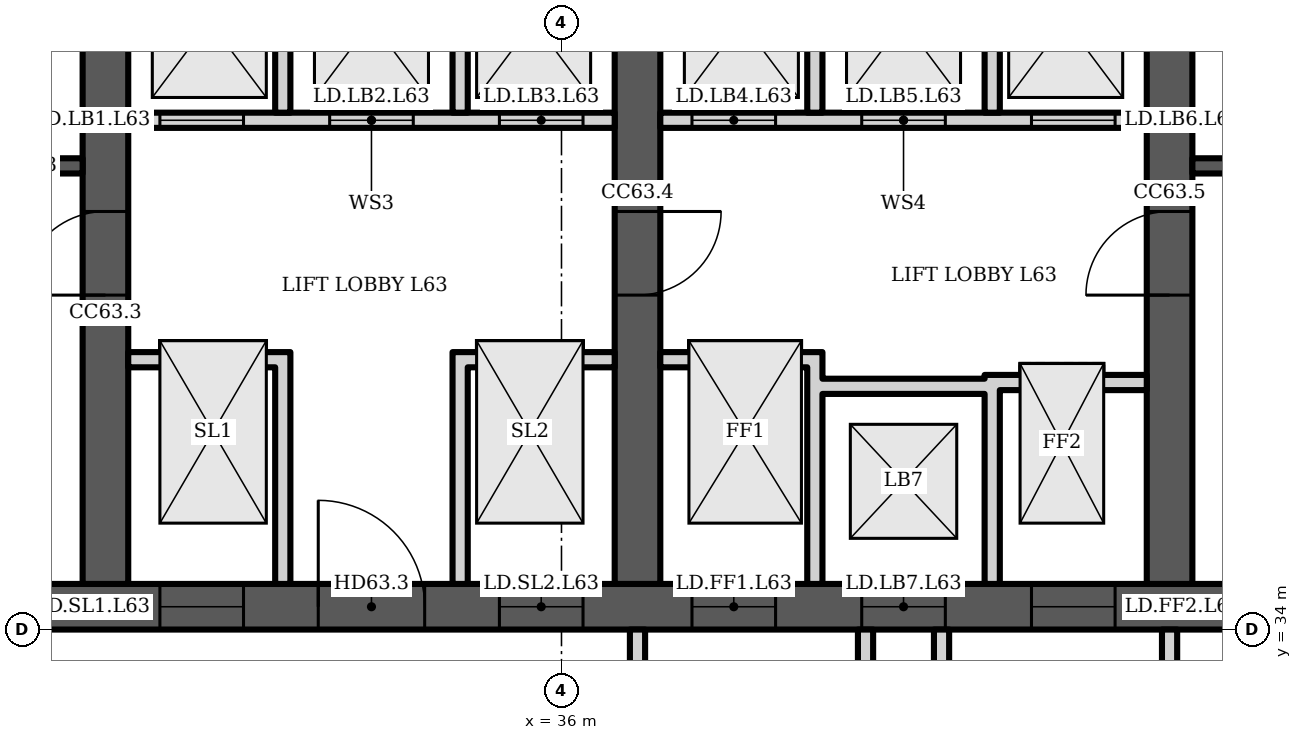
"""IFC4 building model, lengths in metres.
Left out: names, types, materials, properties, quantities, classifications, styles, units other than length and angle.
Written with IfcOpenShell. Run it as: python <this file> out.ifc"""

import sys

from ifc_helpers import new_model, si_unit, direction, frame, frame_2d, origin, place, context, subcontext, project, spatial, polyline, rectangle, outline, extrude, element, fill, save


model = new_model("IFC4")
c1 = context("Model", 3, precision=1e-05, world=origin(), true_north=direction((0.0, 1.0)))
c2 = subcontext(c1, "Body", "Model", "MODEL_VIEW")
j1 = project(units=[si_unit("LENGTHUNIT", "METRE"), si_unit("PLANEANGLEUNIT", "RADIAN")], contexts=[c1])
p1 = place(None, origin())
s1 = spatial("IfcSite", under=j1, at=p1, CompositionType="ELEMENT")
p2 = place(p1, origin())
s2 = spatial("IfcBuilding", under=s1, at=p2, CompositionType="ELEMENT")
p3 = place(p2, frame((0.0, 0.0, 250.3)))
s3 = spatial("IfcBuildingStorey", under=s2, at=p3, CompositionType="ELEMENT", Elevation=250.3)
p4 = place(p3, frame((23.0, 34.3, 0.0), z_axis=(0.0, 0.0, 1.0), x_axis=(1.0, 0.0, 0.0)))
e1 = element("IfcWall", 1, at=p4, inside=s3, PredefinedType="SHEAR", context=c2, shape_type="SweptSolid", body=[
    extrude(rectangle(XDim=35.0, YDim=0.6, at=frame_2d((17.5, 0.0))), origin(), (0.0, 0.0, 1.0), 3.6),
])
p5 = place(p4, frame((0.65, 0.0, 0.0)))
e2 = element("IfcOpeningElement", 2, at=p5, cuts=e1, PredefinedType="OPENING", context=c2, shape_type="SweptSolid", body=[
    extrude(rectangle(XDim=1.2, YDim=2.1, at=frame_2d((0.6, 1.05))), frame((0.0, 0.31, 0.0), z_axis=(0.0, -1.0, 0.0), x_axis=(1.0, 0.0, 0.0)), (0.0, 0.0, 1.0), 0.62),
])
p6 = place(p4, frame((7.717, 0.0, 0.0)))
e3 = element("IfcOpeningElement", 3, at=p6, cuts=e1, PredefinedType="OPENING", context=c2, shape_type="SweptSolid", body=[
    extrude(rectangle(XDim=1.1, YDim=2.1, at=frame_2d((0.55, 1.05))), frame((0.0, 0.31, 0.0), z_axis=(0.0, -1.0, 0.0), x_axis=(1.0, 0.0, 0.0)), (0.0, 0.0, 1.0), 0.62),
])
p7 = place(p4, frame((12.183, 0.0, 0.0)))
e4 = element("IfcOpeningElement", 4, at=p7, cuts=e1, PredefinedType="OPENING", context=c2, shape_type="SweptSolid", body=[
    extrude(rectangle(XDim=1.1, YDim=2.1, at=frame_2d((0.55, 1.05))), frame((0.0, 0.31, 0.0), z_axis=(0.0, -1.0, 0.0), x_axis=(1.0, 0.0, 0.0)), (0.0, 0.0, 1.0), 0.62),
])
p8 = place(p4, frame((9.8, 0.0, 0.0)))
e5 = element("IfcOpeningElement", 5, at=p8, cuts=e1, PredefinedType="OPENING", context=c2, shape_type="SweptSolid", body=[
    extrude(rectangle(XDim=1.4, YDim=2.1, at=frame_2d((0.7, 1.05))), frame((0.0, 0.31, 0.0), z_axis=(0.0, -1.0, 0.0), x_axis=(1.0, 0.0, 0.0)), (0.0, 0.0, 1.0), 0.62),
])
p9 = place(p4, frame((14.717, 0.0, 0.0)))
e6 = element("IfcOpeningElement", 6, at=p9, cuts=e1, PredefinedType="OPENING", context=c2, shape_type="SweptSolid", body=[
    extrude(rectangle(XDim=1.1, YDim=2.1, at=frame_2d((0.55, 1.05))), frame((0.0, 0.31, 0.0), z_axis=(0.0, -1.0, 0.0), x_axis=(1.0, 0.0, 0.0)), (0.0, 0.0, 1.0), 0.62),
])
p10 = place(p4, frame((16.95, 0.0, 0.0)))
e7 = element("IfcOpeningElement", 7, at=p10, cuts=e1, PredefinedType="OPENING", context=c2, shape_type="SweptSolid", body=[
    extrude(rectangle(XDim=1.1, YDim=2.1, at=frame_2d((0.55, 1.05))), frame((0.0, 0.31, 0.0), z_axis=(0.0, -1.0, 0.0), x_axis=(1.0, 0.0, 0.0)), (0.0, 0.0, 1.0), 0.62),
])
p11 = place(p4, frame((19.183, 0.0, 0.0)))
e8 = element("IfcOpeningElement", 8, at=p11, cuts=e1, PredefinedType="OPENING", context=c2, shape_type="SweptSolid", body=[
    extrude(rectangle(XDim=1.1, YDim=2.1, at=frame_2d((0.55, 1.05))), frame((0.0, 0.31, 0.0), z_axis=(0.0, -1.0, 0.0), x_axis=(1.0, 0.0, 0.0)), (0.0, 0.0, 1.0), 0.62),
])
p12 = place(p4, frame((26.15, 0.0, 0.0)))
e9 = element("IfcOpeningElement", 9, at=p12, cuts=e1, PredefinedType="OPENING", context=c2, shape_type="SweptSolid", body=[
    extrude(rectangle(XDim=1.2, YDim=2.1, at=frame_2d((0.6, 1.05))), frame((0.0, 0.31, 0.0), z_axis=(0.0, -1.0, 0.0), x_axis=(1.0, 0.0, 0.0)), (0.0, 0.0, 1.0), 0.62),
])
p13 = place(p4, frame((28.767, 0.0, 0.0)))
e10 = element("IfcOpeningElement", 10, at=p13, cuts=e1, PredefinedType="OPENING", context=c2, shape_type="SweptSolid", body=[
    extrude(rectangle(XDim=1.0, YDim=2.1, at=frame_2d((0.5, 1.05))), frame((0.0, 0.31, 0.0), z_axis=(0.0, -1.0, 0.0), x_axis=(1.0, 0.0, 0.0)), (0.0, 0.0, 1.0), 0.62),
])
p14 = place(p4, frame((33.083, 0.0, 0.0)))
e11 = element("IfcOpeningElement", 11, at=p14, cuts=e1, PredefinedType="OPENING", context=c2, shape_type="SweptSolid", body=[
    extrude(rectangle(XDim=1.0, YDim=2.1, at=frame_2d((0.5, 1.05))), frame((0.0, 0.31, 0.0), z_axis=(0.0, -1.0, 0.0), x_axis=(1.0, 0.0, 0.0)), (0.0, 0.0, 1.0), 0.62),
])
p15 = place(p4, frame((30.8, 0.0, 0.0)))
e12 = element("IfcOpeningElement", 12, at=p15, cuts=e1, PredefinedType="OPENING", context=c2, shape_type="SweptSolid", body=[
    extrude(rectangle(XDim=1.4, YDim=2.1, at=frame_2d((0.7, 1.05))), frame((0.0, 0.31, 0.0), z_axis=(0.0, -1.0, 0.0), x_axis=(1.0, 0.0, 0.0)), (0.0, 0.0, 1.0), 0.62),
])
p16 = place(p3, frame((30.0, 34.6, 0.0), z_axis=(0.0, 0.0, 1.0), x_axis=(0.0, 1.0, 0.0)))
e13 = element("IfcWall", 13, at=p16, inside=s3, PredefinedType="SHEAR", context=c2, shape_type="SweptSolid", body=[
    extrude(rectangle(XDim=14.171, YDim=0.6, at=frame_2d((7.085, 0.0))), origin(), (0.0, 0.0, 1.0), 3.6),
])
p17 = place(p16, frame((3.8, 0.0, 0.0)))
e14 = element("IfcOpeningElement", 14, at=p17, cuts=e13, PredefinedType="OPENING", context=c2, shape_type="SweptSolid", body=[
    extrude(rectangle(XDim=1.1, YDim=2.1, at=frame_2d((0.55, 1.05))), frame((0.0, 0.31, 0.0), z_axis=(0.0, -1.0, 0.0), x_axis=(1.0, 0.0, 0.0)), (0.0, 0.0, 1.0), 0.62),
])
p18 = place(p3, frame((37.0, 34.6, 0.0), z_axis=(0.0, 0.0, 1.0), x_axis=(0.0, 1.0, 0.0)))
e15 = element("IfcWall", 15, at=p18, inside=s3, PredefinedType="SHEAR", context=c2, shape_type="SweptSolid", body=[
    extrude(rectangle(XDim=14.784, YDim=0.6, at=frame_2d((7.392, 0.0))), origin(), (0.0, 0.0, 1.0), 3.6),
])
p19 = place(p18, frame((11.302, 0.0, 0.0)))
e16 = element("IfcOpeningElement", 16, at=p19, cuts=e15, PredefinedType="OPENING", context=c2, shape_type="SweptSolid", body=[
    extrude(rectangle(XDim=1.0, YDim=2.1, at=frame_2d((0.5, 1.05))), frame((0.0, 0.31, 0.0), z_axis=(0.0, -1.0, 0.0), x_axis=(1.0, 0.0, 0.0)), (0.0, 0.0, 1.0), 0.62),
])
p20 = place(p18, frame((3.8, 0.0, 0.0)))
e17 = element("IfcOpeningElement", 17, at=p20, cuts=e15, PredefinedType="OPENING", context=c2, shape_type="SweptSolid", body=[
    extrude(rectangle(XDim=1.1, YDim=2.1, at=frame_2d((0.55, 1.05))), frame((0.0, 0.31, 0.0), z_axis=(0.0, -1.0, 0.0), x_axis=(1.0, 0.0, 0.0)), (0.0, 0.0, 1.0), 0.62),
])
p21 = place(p3, frame((44.0, 34.6, 0.0), z_axis=(0.0, 0.0, 1.0), x_axis=(0.0, 1.0, 0.0)))
e18 = element("IfcWall", 18, at=p21, inside=s3, PredefinedType="SHEAR", context=c2, shape_type="SweptSolid", body=[
    extrude(rectangle(XDim=14.784, YDim=0.6, at=frame_2d((7.392, 0.0))), origin(), (0.0, 0.0, 1.0), 3.6),
])
p22 = place(p21, frame((11.608, 0.0, 0.0)))
e19 = element("IfcOpeningElement", 19, at=p22, cuts=e18, PredefinedType="OPENING", context=c2, shape_type="SweptSolid", body=[
    extrude(rectangle(XDim=1.0, YDim=2.1, at=frame_2d((0.5, 1.05))), frame((0.0, 0.31, 0.0), z_axis=(0.0, -1.0, 0.0), x_axis=(1.0, 0.0, 0.0)), (0.0, 0.0, 1.0), 0.62),
])
p23 = place(p21, frame((3.8, 0.0, 0.0)))
e20 = element("IfcOpeningElement", 20, at=p23, cuts=e18, PredefinedType="OPENING", context=c2, shape_type="SweptSolid", body=[
    extrude(rectangle(XDim=1.1, YDim=2.1, at=frame_2d((0.55, 1.05))), frame((0.0, 0.31, 0.0), z_axis=(0.0, -1.0, 0.0), x_axis=(1.0, 0.0, 0.0)), (0.0, 0.0, 1.0), 0.62),
])
p24 = place(p3, frame((23.6, 40.1, 0.0), z_axis=(0.0, 0.0, 1.0), x_axis=(1.0, 0.0, 0.0)))
e21 = element("IfcWall", 21, at=p24, inside=s3, PredefinedType="SHEAR", context=c2, shape_type="SweptSolid", body=[
    extrude(rectangle(XDim=6.1, YDim=0.2, at=frame_2d((3.05, 0.0))), origin(), (0.0, 0.0, 1.0), 3.2),
])
p25 = place(p24, frame((3.325, 0.0, 0.0)))
e22 = element("IfcOpeningElement", 22, at=p25, cuts=e21, PredefinedType="OPENING", context=c2, shape_type="SweptSolid", body=[
    extrude(rectangle(XDim=1.2, YDim=2.1, at=frame_2d((0.6, 1.05))), frame((0.0, 0.11, 0.0), z_axis=(0.0, -1.0, 0.0), x_axis=(1.0, 0.0, 0.0)), (0.0, 0.0, 1.0), 0.22),
])
p26 = place(p24, frame((0.475, 0.0, 0.0)))
e23 = element("IfcOpeningElement", 23, at=p26, cuts=e21, PredefinedType="OPENING", context=c2, shape_type="SweptSolid", body=[
    extrude(rectangle(XDim=0.9, YDim=2.1, at=frame_2d((0.45, 1.05))), frame((0.0, 0.11, 0.0), z_axis=(0.0, -1.0, 0.0), x_axis=(1.0, 0.0, 0.0)), (0.0, 0.0, 1.0), 0.22),
])
p27 = place(p3, frame((30.3, 40.7, 0.0), z_axis=(0.0, 0.0, 1.0), x_axis=(1.0, 0.0, 0.0)))
e24 = element("IfcWall", 24, at=p27, inside=s3, PredefinedType="PARTITIONING", context=c2, shape_type="SweptSolid", body=[
    extrude(rectangle(XDim=6.4, YDim=0.2, at=frame_2d((3.2, 0.0))), origin(), (0.0, 0.0, 1.0), 3.2),
])
p28 = place(p27, frame((0.417, 0.0, 0.0)))
e25 = element("IfcOpeningElement", 25, at=p28, cuts=e24, PredefinedType="OPENING", context=c2, shape_type="SweptSolid", body=[
    extrude(rectangle(XDim=1.1, YDim=2.1, at=frame_2d((0.55, 1.05))), frame((0.0, 0.11, 0.0), z_axis=(0.0, -1.0, 0.0), x_axis=(1.0, 0.0, 0.0)), (0.0, 0.0, 1.0), 0.22),
])
p29 = place(p27, frame((2.65, 0.0, 0.0)))
e26 = element("IfcOpeningElement", 26, at=p29, cuts=e24, PredefinedType="OPENING", context=c2, shape_type="SweptSolid", body=[
    extrude(rectangle(XDim=1.1, YDim=2.1, at=frame_2d((0.55, 1.05))), frame((0.0, 0.11, 0.0), z_axis=(0.0, -1.0, 0.0), x_axis=(1.0, 0.0, 0.0)), (0.0, 0.0, 1.0), 0.22),
])
p30 = place(p27, frame((4.883, 0.0, 0.0)))
e27 = element("IfcOpeningElement", 27, at=p30, cuts=e24, PredefinedType="OPENING", context=c2, shape_type="SweptSolid", body=[
    extrude(rectangle(XDim=1.1, YDim=2.1, at=frame_2d((0.55, 1.05))), frame((0.0, 0.11, 0.0), z_axis=(0.0, -1.0, 0.0), x_axis=(1.0, 0.0, 0.0)), (0.0, 0.0, 1.0), 0.22),
])
p31 = place(p3, frame((0.0, 0.0, -0.0)))
e28 = element("IfcWall", 28, at=p31, inside=s3, PredefinedType="PARTITIONING", context=c2, shape_type="SweptSolid", body=[
    extrude(outline(polyline([(32.233, 37.45), (30.3, 37.45), (30.3, 37.65), (32.233, 37.65), (32.433, 37.65), (32.433, 34.6), (32.233, 34.6), (32.233, 37.45)])), origin(), (0.0, 0.0, 1.0), 3.2),
])
p32 = place(p3, frame((0.0, 0.0, -0.0)))
e29 = element("IfcWall", 29, at=p32, inside=s3, PredefinedType="PARTITIONING", context=c2, shape_type="SweptSolid", body=[
    extrude(outline(polyline([(34.567, 37.65), (34.767, 37.65), (36.7, 37.65), (36.7, 37.45), (34.767, 37.45), (34.767, 34.6), (34.567, 34.6), (34.567, 37.65)])), origin(), (0.0, 0.0, 1.0), 3.2),
])
p33 = place(p3, frame((0.0, 0.0, -0.0)))
e30 = element("IfcWall", 30, at=p33, inside=s3, PredefinedType="PARTITIONING", context=c2, shape_type="SweptSolid", body=[
    extrude(outline(polyline([(32.433, 40.8), (32.233, 40.8), (32.233, 43.8), (30.3, 43.8), (30.3, 44.0), (36.7, 44.0), (36.7, 43.8), (34.767, 43.8), (34.767, 40.8), (34.567, 40.8), (34.567, 43.8), (32.433, 43.8), (32.433, 40.8)])), origin(), (0.0, 0.0, 1.0), 3.2),
])
p34 = place(p3, frame((37.3, 40.7, 0.0), z_axis=(0.0, 0.0, 1.0), x_axis=(1.0, 0.0, 0.0)))
e31 = element("IfcWall", 31, at=p34, inside=s3, PredefinedType="PARTITIONING", context=c2, shape_type="SweptSolid", body=[
    extrude(rectangle(XDim=6.4, YDim=0.2, at=frame_2d((3.2, 0.0))), origin(), (0.0, 0.0, 1.0), 3.2),
])
p35 = place(p34, frame((0.417, 0.0, 0.0)))
e32 = element("IfcOpeningElement", 32, at=p35, cuts=e31, PredefinedType="OPENING", context=c2, shape_type="SweptSolid", body=[
    extrude(rectangle(XDim=1.1, YDim=2.1, at=frame_2d((0.55, 1.05))), frame((0.0, 0.11, 0.0), z_axis=(0.0, -1.0, 0.0), x_axis=(1.0, 0.0, 0.0)), (0.0, 0.0, 1.0), 0.22),
])
p36 = place(p34, frame((2.65, 0.0, 0.0)))
e33 = element("IfcOpeningElement", 33, at=p36, cuts=e31, PredefinedType="OPENING", context=c2, shape_type="SweptSolid", body=[
    extrude(rectangle(XDim=1.1, YDim=2.1, at=frame_2d((0.55, 1.05))), frame((0.0, 0.11, 0.0), z_axis=(0.0, -1.0, 0.0), x_axis=(1.0, 0.0, 0.0)), (0.0, 0.0, 1.0), 0.22),
])
p37 = place(p34, frame((4.883, 0.0, 0.0)))
e34 = element("IfcOpeningElement", 34, at=p37, cuts=e31, PredefinedType="OPENING", context=c2, shape_type="SweptSolid", body=[
    extrude(rectangle(XDim=1.1, YDim=2.1, at=frame_2d((0.55, 1.05))), frame((0.0, 0.11, 0.0), z_axis=(0.0, -1.0, 0.0), x_axis=(1.0, 0.0, 0.0)), (0.0, 0.0, 1.0), 0.22),
])
p38 = place(p3, frame((0.0, 0.0, -0.0)))
e35 = element("IfcWall", 35, at=p38, inside=s3, PredefinedType="PARTITIONING", context=c2, shape_type="SweptSolid", body=[
    extrude(outline(polyline([(41.567, 37.1), (39.433, 37.1), (39.433, 34.6), (39.233, 34.6), (39.233, 37.45), (37.3, 37.45), (37.3, 37.65), (39.233, 37.65), (39.433, 37.65), (39.433, 37.3), (41.567, 37.3), (41.567, 37.35), (41.767, 37.35), (43.7, 37.35), (43.7, 37.15), (41.767, 37.15), (41.767, 34.6), (41.567, 34.6), (41.567, 37.1)])), origin(), (0.0, 0.0, 1.0), 3.2),
])
p39 = place(p3, frame((0.0, 0.0, -0.0)))
e36 = element("IfcWall", 36, at=p39, inside=s3, PredefinedType="PARTITIONING", context=c2, shape_type="SweptSolid", body=[
    extrude(outline(polyline([(39.433, 40.8), (39.233, 40.8), (39.233, 43.8), (37.3, 43.8), (37.3, 44.0), (43.7, 44.0), (43.7, 43.8), (41.767, 43.8), (41.767, 40.8), (41.567, 40.8), (41.567, 43.8), (39.433, 43.8), (39.433, 40.8)])), origin(), (0.0, 0.0, 1.0), 3.2),
])
p40 = place(p3, frame((44.3, 40.1, 0.0), z_axis=(0.0, 0.0, 1.0), x_axis=(1.0, 0.0, 0.0)))
e37 = element("IfcWall", 37, at=p40, inside=s3, PredefinedType="SHEAR", context=c2, shape_type="SweptSolid", body=[
    extrude(rectangle(XDim=6.4, YDim=0.2, at=frame_2d((3.2, 0.0))), origin(), (0.0, 0.0, 1.0), 3.2),
])
p41 = place(p40, frame((3.625, 0.0, 0.0)))
e38 = element("IfcOpeningElement", 38, at=p41, cuts=e37, PredefinedType="OPENING", context=c2, shape_type="SweptSolid", body=[
    extrude(rectangle(XDim=1.2, YDim=2.1, at=frame_2d((0.6, 1.05))), frame((0.0, 0.11, 0.0), z_axis=(0.0, -1.0, 0.0), x_axis=(1.0, 0.0, 0.0)), (0.0, 0.0, 1.0), 0.22),
])
p42 = place(p40, frame((0.625, 0.0, 0.0)))
e39 = element("IfcOpeningElement", 39, at=p42, cuts=e37, PredefinedType="OPENING", context=c2, shape_type="SweptSolid", body=[
    extrude(rectangle(XDim=0.9, YDim=2.1, at=frame_2d((0.45, 1.05))), frame((0.0, 0.11, 0.0), z_axis=(0.0, -1.0, 0.0), x_axis=(1.0, 0.0, 0.0)), (0.0, 0.0, 1.0), 0.22),
])
p43 = place(p3, frame((37.0, 30.5, 0.0), z_axis=(0.0, 0.0, 1.0), x_axis=(0.0, 1.0, 0.0)))
e40 = element("IfcWall", 40, at=p43, inside=s3, PredefinedType="PARTITIONING", context=c2, shape_type="SweptSolid", body=[
    extrude(rectangle(XDim=3.5, YDim=0.2, at=frame_2d((1.75, 0.0))), origin(), (0.0, 0.0, 1.0), 3.2),
])
p44 = place(p43, frame((1.2, 0.0, 0.0)))
e41 = element("IfcOpeningElement", 41, at=p44, cuts=e40, PredefinedType="OPENING", context=c2, shape_type="SweptSolid", body=[
    extrude(rectangle(XDim=1.1, YDim=2.1, at=frame_2d((0.55, 1.05))), frame((0.0, 0.11, 0.0), z_axis=(0.0, -1.0, 0.0), x_axis=(1.0, 0.0, 0.0)), (0.0, 0.0, 1.0), 0.22),
])
for number, where, z_axis, x_axis in (
    (42, (40.0, 30.5, 0.0), (0.0, 0.0, 1.0), (0.0, 1.0, 0.0)),
    (43, (41.0, 30.5, 0.0), (0.0, 0.0, 1.0), (0.0, 1.0, 0.0)),
):
    element("IfcWall", number, at=place(p3, frame(where, z_axis=z_axis, x_axis=x_axis)), inside=s3, PredefinedType="PARTITIONING", context=c2, shape_type="SweptSolid", body=[
        extrude(rectangle(XDim=3.5, YDim=0.2, at=frame_2d((1.75, 0.0))), origin(), (0.0, 0.0, 1.0), 3.2),
    ])
p45 = place(p3, frame((44.0, 30.5, 0.0), z_axis=(0.0, 0.0, 1.0), x_axis=(0.0, 1.0, 0.0)))
e44 = element("IfcWall", 44, at=p45, inside=s3, PredefinedType="PARTITIONING", context=c2, shape_type="SweptSolid", body=[
    extrude(rectangle(XDim=3.5, YDim=0.2, at=frame_2d((1.75, 0.0))), origin(), (0.0, 0.0, 1.0), 3.2),
])
p46 = place(p45, frame((1.2, 0.0, 0.0)))
e45 = element("IfcOpeningElement", 45, at=p46, cuts=e44, PredefinedType="OPENING", context=c2, shape_type="SweptSolid", body=[
    extrude(rectangle(XDim=1.1, YDim=2.1, at=frame_2d((0.55, 1.05))), frame((0.0, 0.11, 0.0), z_axis=(0.0, -1.0, 0.0), x_axis=(1.0, 0.0, 0.0)), (0.0, 0.0, 1.0), 0.22),
])
p47 = place(p6, origin())
e46 = element("IfcDoor", 46, at=p47, inside=s3, OperationType="DOUBLE_DOOR_SLIDING", PredefinedType="DOOR", context=c2, shape_type="SweptSolid", body=[
    extrude(rectangle(XDim=1.1, YDim=2.1, at=frame_2d((0.55, 1.05))), frame((0.0, 0.025, 0.0), z_axis=(0.0, -1.0, 0.0), x_axis=(1.0, 0.0, 0.0)), (0.0, 0.0, 1.0), 0.05),
])
fill(e3, e46)
p48 = place(p7, origin())
e47 = element("IfcDoor", 47, at=p48, inside=s3, OperationType="DOUBLE_DOOR_SLIDING", PredefinedType="DOOR", context=c2, shape_type="SweptSolid", body=[
    extrude(rectangle(XDim=1.1, YDim=2.1, at=frame_2d((0.55, 1.05))), frame((0.0, 0.025, 0.0), z_axis=(0.0, -1.0, 0.0), x_axis=(1.0, 0.0, 0.0)), (0.0, 0.0, 1.0), 0.05),
])
fill(e4, e47)
p49 = place(p8, origin())
e48 = element("IfcDoor", 48, at=p49, inside=s3, OperationType="DOUBLE_DOOR_SINGLE_SWING", PredefinedType="DOOR", context=c2, shape_type="SweptSolid", body=[
    extrude(rectangle(XDim=1.4, YDim=2.1, at=frame_2d((0.7, 1.05))), frame((0.0, 0.025, 0.0), z_axis=(0.0, -1.0, 0.0), x_axis=(1.0, 0.0, 0.0)), (0.0, 0.0, 1.0), 0.05),
])
fill(e5, e48)
p50 = place(p28, origin())
e49 = element("IfcDoor", 49, at=p50, inside=s3, OperationType="DOUBLE_DOOR_SLIDING", PredefinedType="DOOR", context=c2, shape_type="SweptSolid", body=[
    extrude(rectangle(XDim=1.1, YDim=2.1, at=frame_2d((0.55, 1.05))), frame((0.0, 0.025, 0.0), z_axis=(0.0, -1.0, 0.0), x_axis=(1.0, 0.0, 0.0)), (0.0, 0.0, 1.0), 0.05),
])
fill(e25, e49)
p51 = place(p29, origin())
e50 = element("IfcDoor", 50, at=p51, inside=s3, OperationType="DOUBLE_DOOR_SLIDING", PredefinedType="DOOR", context=c2, shape_type="SweptSolid", body=[
    extrude(rectangle(XDim=1.1, YDim=2.1, at=frame_2d((0.55, 1.05))), frame((0.0, 0.025, 0.0), z_axis=(0.0, -1.0, 0.0), x_axis=(1.0, 0.0, 0.0)), (0.0, 0.0, 1.0), 0.05),
])
fill(e26, e50)
p52 = place(p30, origin())
e51 = element("IfcDoor", 51, at=p52, inside=s3, OperationType="DOUBLE_DOOR_SLIDING", PredefinedType="DOOR", context=c2, shape_type="SweptSolid", body=[
    extrude(rectangle(XDim=1.1, YDim=2.1, at=frame_2d((0.55, 1.05))), frame((0.0, 0.025, 0.0), z_axis=(0.0, -1.0, 0.0), x_axis=(1.0, 0.0, 0.0)), (0.0, 0.0, 1.0), 0.05),
])
fill(e27, e51)
p53 = place(p9, origin())
e52 = element("IfcDoor", 52, at=p53, inside=s3, OperationType="DOUBLE_DOOR_SLIDING", PredefinedType="DOOR", context=c2, shape_type="SweptSolid", body=[
    extrude(rectangle(XDim=1.1, YDim=2.1, at=frame_2d((0.55, 1.05))), frame((0.0, 0.025, 0.0), z_axis=(0.0, -1.0, 0.0), x_axis=(1.0, 0.0, 0.0)), (0.0, 0.0, 1.0), 0.05),
])
fill(e6, e52)
p54 = place(p10, origin())
e53 = element("IfcDoor", 53, at=p54, inside=s3, OperationType="DOUBLE_DOOR_SLIDING", PredefinedType="DOOR", context=c2, shape_type="SweptSolid", body=[
    extrude(rectangle(XDim=1.1, YDim=2.1, at=frame_2d((0.55, 1.05))), frame((0.0, 0.025, 0.0), z_axis=(0.0, -1.0, 0.0), x_axis=(1.0, 0.0, 0.0)), (0.0, 0.0, 1.0), 0.05),
])
fill(e7, e53)
p55 = place(p11, origin())
e54 = element("IfcDoor", 54, at=p55, inside=s3, OperationType="DOUBLE_DOOR_SLIDING", PredefinedType="DOOR", context=c2, shape_type="SweptSolid", body=[
    extrude(rectangle(XDim=1.1, YDim=2.1, at=frame_2d((0.55, 1.05))), frame((0.0, 0.025, 0.0), z_axis=(0.0, -1.0, 0.0), x_axis=(1.0, 0.0, 0.0)), (0.0, 0.0, 1.0), 0.05),
])
fill(e8, e54)
p56 = place(p35, origin())
e55 = element("IfcDoor", 55, at=p56, inside=s3, OperationType="DOUBLE_DOOR_SLIDING", PredefinedType="DOOR", context=c2, shape_type="SweptSolid", body=[
    extrude(rectangle(XDim=1.1, YDim=2.1, at=frame_2d((0.55, 1.05))), frame((0.0, 0.025, 0.0), z_axis=(0.0, -1.0, 0.0), x_axis=(1.0, 0.0, 0.0)), (0.0, 0.0, 1.0), 0.05),
])
fill(e32, e55)
p57 = place(p36, origin())
e56 = element("IfcDoor", 56, at=p57, inside=s3, OperationType="DOUBLE_DOOR_SLIDING", PredefinedType="DOOR", context=c2, shape_type="SweptSolid", body=[
    extrude(rectangle(XDim=1.1, YDim=2.1, at=frame_2d((0.55, 1.05))), frame((0.0, 0.025, 0.0), z_axis=(0.0, -1.0, 0.0), x_axis=(1.0, 0.0, 0.0)), (0.0, 0.0, 1.0), 0.05),
])
fill(e33, e56)
p58 = place(p37, origin())
e57 = element("IfcDoor", 57, at=p58, inside=s3, OperationType="DOUBLE_DOOR_SLIDING", PredefinedType="DOOR", context=c2, shape_type="SweptSolid", body=[
    extrude(rectangle(XDim=1.1, YDim=2.1, at=frame_2d((0.55, 1.05))), frame((0.0, 0.025, 0.0), z_axis=(0.0, -1.0, 0.0), x_axis=(1.0, 0.0, 0.0)), (0.0, 0.0, 1.0), 0.05),
])
fill(e34, e57)
p59 = place(p17, origin())
e58 = element("IfcDoor", 58, at=p59, inside=s3, OperationType="SINGLE_SWING_LEFT", PredefinedType="DOOR", context=c2, shape_type="SweptSolid", body=[
    extrude(rectangle(XDim=1.1, YDim=2.1, at=frame_2d((0.55, 1.05))), frame((0.0, 0.025, 0.0), z_axis=(0.0, -1.0, 0.0), x_axis=(1.0, 0.0, 0.0)), (0.0, 0.0, 1.0), 0.05),
])
fill(e14, e58)
p60 = place(p20, origin())
e59 = element("IfcDoor", 59, at=p60, inside=s3, OperationType="SINGLE_SWING_RIGHT", PredefinedType="DOOR", context=c2, shape_type="SweptSolid", body=[
    extrude(rectangle(XDim=1.1, YDim=2.1, at=frame_2d((0.55, 1.05))), frame((0.0, 0.025, 0.0), z_axis=(0.0, -1.0, 0.0), x_axis=(1.0, 0.0, 0.0)), (0.0, 0.0, 1.0), 0.05),
])
fill(e17, e59)
p61 = place(p23, origin())
e60 = element("IfcDoor", 60, at=p61, inside=s3, OperationType="SINGLE_SWING_LEFT", PredefinedType="DOOR", context=c2, shape_type="SweptSolid", body=[
    extrude(rectangle(XDim=1.1, YDim=2.1, at=frame_2d((0.55, 1.05))), frame((0.0, 0.025, 0.0), z_axis=(0.0, -1.0, 0.0), x_axis=(1.0, 0.0, 0.0)), (0.0, 0.0, 1.0), 0.05),
])
fill(e20, e60)
save(model, sys.argv[1])
